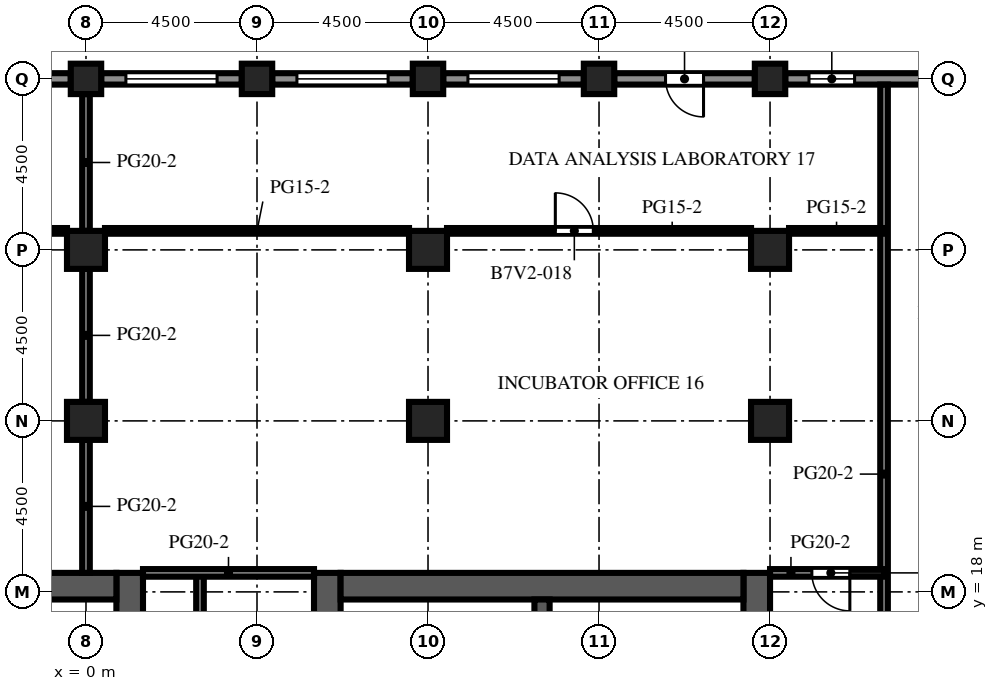
"""IFC4 building model, lengths in metres.
Left out: names, types, materials, properties, quantities, classifications, styles, units other than length and angle.
Written with IfcOpenShell. Run it as: python <this file> out.ifc"""

import sys

from ifc_helpers import new_model, si_unit, direction, frame, frame_2d, origin, origin_2d, place, context, subcontext, project, spatial, rectangle, extrude, element, fill, save


model = new_model("IFC4")
c1 = context("Model", 3, precision=1e-05, world=origin(), true_north=direction((0.0, 1.0)))
c2 = subcontext(c1, "Body", "Model", "MODEL_VIEW")
j1 = project(units=[si_unit("LENGTHUNIT", "METRE"), si_unit("PLANEANGLEUNIT", "RADIAN")], contexts=[c1])
p1 = place(None, origin())
s1 = spatial("IfcSite", under=j1, at=p1, CompositionType="ELEMENT")
p2 = place(p1, origin())
s2 = spatial("IfcBuilding", under=s1, at=p2, CompositionType="ELEMENT")
p3 = place(p2, frame((0.0, 0.0, 256.2)))
s3 = spatial("IfcBuildingStorey", under=s2, at=p3, CompositionType="ELEMENT", Elevation=256.2)
for number, where, z_axis, x_axis in (
    (1, (0.0, 31.5, 0.0), (0.0, 0.0, 1.0), (1.0, 0.0, 0.0)),
    (2, (4.5, 31.5, 0.0), (0.0, 0.0, 1.0), (1.0, 0.0, 0.0)),
    (3, (9.0, 31.5, 0.0), (0.0, 0.0, 1.0), (1.0, 0.0, 0.0)),
    (4, (13.5, 31.5, 0.0), (0.0, 0.0, 1.0), (1.0, 0.0, 0.0)),
    (5, (18.0, 31.5, 0.0), (0.0, 0.0, 1.0), (1.0, 0.0, 0.0)),
):
    element("IfcColumn", number, at=place(p3, frame(where, z_axis=z_axis, x_axis=x_axis)), inside=s3, PredefinedType="COLUMN", context=c2, shape_type="SweptSolid", body=[
        extrude(rectangle(XDim=0.8, YDim=0.8, at=origin_2d()), origin(), (0.0, 0.0, 1.0), 4.1),
    ])
for number, where, z_axis, x_axis in (
    (6, (0.0, 22.5, 0.0), (0.0, 0.0, 1.0), (1.0, 0.0, 0.0)),
    (7, (0.0, 27.0, 0.0), (0.0, 0.0, 1.0), (1.0, 0.0, 0.0)),
    (8, (9.0, 22.5, 0.0), (0.0, 0.0, 1.0), (1.0, 0.0, 0.0)),
    (9, (9.0, 27.0, 0.0), (0.0, 0.0, 1.0), (1.0, 0.0, 0.0)),
    (10, (18.0, 22.5, 0.0), (0.0, 0.0, 1.0), (1.0, 0.0, 0.0)),
    (11, (18.0, 27.0, 0.0), (0.0, 0.0, 1.0), (1.0, 0.0, 0.0)),
):
    element("IfcColumn", number, at=place(p3, frame(where, z_axis=z_axis, x_axis=x_axis)), inside=s3, PredefinedType="COLUMN", context=c2, shape_type="SweptSolid", body=[
        extrude(rectangle(XDim=1.0, YDim=1.0, at=origin_2d()), origin(), (0.0, 0.0, 1.0), 4.1),
    ])
p4 = place(p3, frame((1.15, -9.0, 0.0), z_axis=(0.0, 0.0, 1.0), x_axis=(0.0, 1.0, 0.0)))
e12 = element("IfcWall", 12, at=p4, inside=s3, PredefinedType="SHEAR", context=c2, shape_type="SweptSolid", body=[
    extrude(rectangle(XDim=27.5, YDim=0.7, at=frame_2d((13.75, 0.0))), origin(), (0.0, 0.0, 1.0), 4.1),
])
p5 = place(p4, frame((12.55, 0.0, 0.0)))
e13 = element("IfcOpeningElement", 13, at=p5, cuts=e12, PredefinedType="OPENING", context=c2, shape_type="SweptSolid", body=[
    extrude(rectangle(XDim=2.4, YDim=2.4, at=frame_2d((1.2, 1.2))), frame((0.0, 0.36, 0.0), z_axis=(0.0, -1.0, 0.0), x_axis=(1.0, 0.0, 0.0)), (0.0, 0.0, 1.0), 0.72),
])
p6 = place(p4, frame((3.788, 0.0, 0.0)))
e14 = element("IfcOpeningElement", 14, at=p6, cuts=e12, PredefinedType="OPENING", context=c2, shape_type="SweptSolid", body=[
    extrude(rectangle(XDim=0.968, YDim=2.1, at=frame_2d((0.484, 1.05))), frame((0.0, 0.36, 0.0), z_axis=(0.0, -1.0, 0.0), x_axis=(1.0, 0.0, 0.0)), (0.0, 0.0, 1.0), 0.72),
])
p7 = place(p4, frame((23.54, 0.0, 0.0)))
e15 = element("IfcOpeningElement", 15, at=p7, cuts=e12, PredefinedType="OPENING", context=c2, shape_type="SweptSolid", body=[
    extrude(rectangle(XDim=1.2, YDim=2.1, at=frame_2d((0.6, 1.05))), frame((0.0, 0.36, 0.0), z_axis=(0.0, -1.0, 0.0), x_axis=(1.0, 0.0, 0.0)), (0.0, 0.0, 1.0), 0.72),
])
p8 = place(p3, frame((-9.8, 18.15, 0.0), z_axis=(0.0, 0.0, 1.0), x_axis=(1.0, 0.0, 0.0)))
e16 = element("IfcWall", 16, at=p8, inside=s3, PredefinedType="SHEAR", context=c2, shape_type="SweptSolid", body=[
    extrude(rectangle(XDim=10.6, YDim=0.7, at=frame_2d((5.3, 0.0))), origin(), (0.0, 0.0, 1.0), 4.1),
])
p9 = place(p3, frame((6.35, -9.0, 0.0), z_axis=(0.0, 0.0, 1.0), x_axis=(0.0, 1.0, 0.0)))
e17 = element("IfcWall", 17, at=p9, inside=s3, PredefinedType="SHEAR", context=c2, shape_type="SweptSolid", body=[
    extrude(rectangle(XDim=27.5, YDim=0.7, at=frame_2d((13.75, 0.0))), origin(), (0.0, 0.0, 1.0), 4.1),
])
p10 = place(p9, frame((12.55, 0.0, 0.0)))
e18 = element("IfcOpeningElement", 18, at=p10, cuts=e17, PredefinedType="OPENING", context=c2, shape_type="SweptSolid", body=[
    extrude(rectangle(XDim=2.4, YDim=2.4, at=frame_2d((1.2, 1.2))), frame((0.0, 0.36, 0.0), z_axis=(0.0, -1.0, 0.0), x_axis=(1.0, 0.0, 0.0)), (0.0, 0.0, 1.0), 0.72),
])
p11 = place(p9, frame((3.788, 0.0, 0.0)))
e19 = element("IfcOpeningElement", 19, at=p11, cuts=e17, PredefinedType="OPENING", context=c2, shape_type="SweptSolid", body=[
    extrude(rectangle(XDim=0.968, YDim=2.1, at=frame_2d((0.484, 1.05))), frame((0.0, 0.36, 0.0), z_axis=(0.0, -1.0, 0.0), x_axis=(1.0, 0.0, 0.0)), (0.0, 0.0, 1.0), 0.72),
])
p12 = place(p9, frame((23.54, 0.0, 0.0)))
e20 = element("IfcOpeningElement", 20, at=p12, cuts=e17, PredefinedType="OPENING", context=c2, shape_type="SweptSolid", body=[
    extrude(rectangle(XDim=1.2, YDim=2.1, at=frame_2d((0.6, 1.05))), frame((0.0, 0.36, 0.0), z_axis=(0.0, -1.0, 0.0), x_axis=(1.0, 0.0, 0.0)), (0.0, 0.0, 1.0), 0.72),
])
p13 = place(p3, frame((17.65, -9.0, 0.0), z_axis=(0.0, 0.0, 1.0), x_axis=(0.0, 1.0, 0.0)))
e21 = element("IfcWall", 21, at=p13, inside=s3, PredefinedType="SHEAR", context=c2, shape_type="SweptSolid", body=[
    extrude(rectangle(XDim=27.5, YDim=0.7, at=frame_2d((13.75, 0.0))), origin(), (0.0, 0.0, 1.0), 4.1),
])
p14 = place(p13, frame((12.55, 0.0, 0.0)))
e22 = element("IfcOpeningElement", 22, at=p14, cuts=e21, PredefinedType="OPENING", context=c2, shape_type="SweptSolid", body=[
    extrude(rectangle(XDim=2.4, YDim=2.4, at=frame_2d((1.2, 1.2))), frame((0.0, 0.36, 0.0), z_axis=(0.0, -1.0, 0.0), x_axis=(1.0, 0.0, 0.0)), (0.0, 0.0, 1.0), 0.72),
])
p15 = place(p13, frame((6.825, 0.0, 0.0)))
e23 = element("IfcOpeningElement", 23, at=p15, cuts=e21, PredefinedType="OPENING", context=c2, shape_type="SweptSolid", body=[
    extrude(rectangle(XDim=1.2, YDim=2.1, at=frame_2d((0.6, 1.05))), frame((0.0, 0.36, 0.0), z_axis=(0.0, -1.0, 0.0), x_axis=(1.0, 0.0, 0.0)), (0.0, 0.0, 1.0), 0.72),
])
p16 = place(p13, frame((19.475, 0.0, 0.0)))
e24 = element("IfcOpeningElement", 24, at=p16, cuts=e21, PredefinedType="OPENING", context=c2, shape_type="SweptSolid", body=[
    extrude(rectangle(XDim=1.2, YDim=2.1, at=frame_2d((0.6, 1.05))), frame((0.0, 0.36, 0.0), z_axis=(0.0, -1.0, 0.0), x_axis=(1.0, 0.0, 0.0)), (0.0, 0.0, 1.0), 0.72),
])
p17 = place(p3, frame((6.7, 18.15, 0.0), z_axis=(0.0, 0.0, 1.0), x_axis=(1.0, 0.0, 0.0)))
e25 = element("IfcWall", 25, at=p17, inside=s3, PredefinedType="SHEAR", context=c2, shape_type="SweptSolid", body=[
    extrude(rectangle(XDim=10.6, YDim=0.7, at=frame_2d((5.3, 0.0))), origin(), (0.0, 0.0, 1.0), 4.1),
])
p18 = place(p3, frame((12.0, 10.2, 0.0), z_axis=(0.0, 0.0, 1.0), x_axis=(0.0, 1.0, 0.0)))
e26 = element("IfcWall", 26, at=p18, inside=s3, PredefinedType="SHEAR", context=c2, shape_type="SweptSolid", body=[
    extrude(rectangle(XDim=7.6, YDim=0.4, at=frame_2d((3.8, 0.0))), origin(), (0.0, 0.0, 1.0), 4.1),
])
p19 = place(p3, frame((18.4, 31.5, 0.0), z_axis=(0.0, 0.0, 1.0), x_axis=(1.0, 0.0, 0.0)))
e27 = element("IfcWall", 27, at=p19, inside=s3, PredefinedType="SOLIDWALL", context=c2, shape_type="SweptSolid", body=[
    extrude(rectangle(XDim=3.7, YDim=0.3, at=frame_2d((1.85, 0.0))), origin(), (0.0, 0.0, 1.0), 2.7),
])
p20 = place(p19, frame((0.625, 0.0, 0.8)))
e28 = element("IfcOpeningElement", 28, at=p20, cuts=e27, PredefinedType="OPENING", context=c2, shape_type="SweptSolid", body=[
    extrude(rectangle(XDim=1.2, YDim=1.7, at=frame_2d((0.6, 0.85))), frame((0.0, 0.16, 0.0), z_axis=(0.0, -1.0, 0.0), x_axis=(1.0, 0.0, 0.0)), (0.0, 0.0, 1.0), 0.32),
])
p21 = place(p3, frame((13.9, 31.5, 0.0), z_axis=(0.0, 0.0, 1.0), x_axis=(1.0, 0.0, 0.0)))
e29 = element("IfcWall", 29, at=p21, inside=s3, PredefinedType="SOLIDWALL", context=c2, shape_type="SweptSolid", body=[
    extrude(rectangle(XDim=3.7, YDim=0.3, at=frame_2d((1.85, 0.0))), origin(), (0.0, 0.0, 1.0), 2.7),
])
p22 = place(p21, frame((1.35, 0.0, 0.0)))
e30 = element("IfcOpeningElement", 30, at=p22, cuts=e29, PredefinedType="OPENING", context=c2, shape_type="SweptSolid", body=[
    extrude(rectangle(XDim=1.0, YDim=2.2, at=frame_2d((0.5, 1.1))), frame((0.0, 0.16, 0.0), z_axis=(0.0, -1.0, 0.0), x_axis=(1.0, 0.0, 0.0)), (0.0, 0.0, 1.0), 0.32),
])
p23 = place(p3, frame((9.4, 31.5, 0.0), z_axis=(0.0, 0.0, 1.0), x_axis=(1.0, 0.0, 0.0)))
e31 = element("IfcWall", 31, at=p23, inside=s3, PredefinedType="SOLIDWALL", context=c2, shape_type="SweptSolid", body=[
    extrude(rectangle(XDim=3.7, YDim=0.3, at=frame_2d((1.85, 0.0))), origin(), (0.0, 0.0, 1.0), 2.7),
])
p24 = place(p23, frame((0.65, 0.0, 0.8)))
e32 = element("IfcOpeningElement", 32, at=p24, cuts=e31, PredefinedType="OPENING", context=c2, shape_type="SweptSolid", body=[
    extrude(rectangle(XDim=2.4, YDim=1.7, at=frame_2d((1.2, 0.85))), frame((0.0, 0.16, 0.0), z_axis=(0.0, -1.0, 0.0), x_axis=(1.0, 0.0, 0.0)), (0.0, 0.0, 1.0), 0.32),
])
p25 = place(p3, frame((4.9, 31.5, 0.0), z_axis=(0.0, 0.0, 1.0), x_axis=(1.0, 0.0, 0.0)))
e33 = element("IfcWall", 33, at=p25, inside=s3, PredefinedType="SOLIDWALL", context=c2, shape_type="SweptSolid", body=[
    extrude(rectangle(XDim=3.7, YDim=0.3, at=frame_2d((1.85, 0.0))), origin(), (0.0, 0.0, 1.0), 2.7),
])
p26 = place(p25, frame((0.65, 0.0, 0.8)))
e34 = element("IfcOpeningElement", 34, at=p26, cuts=e33, PredefinedType="OPENING", context=c2, shape_type="SweptSolid", body=[
    extrude(rectangle(XDim=2.4, YDim=1.7, at=frame_2d((1.2, 0.85))), frame((0.0, 0.16, 0.0), z_axis=(0.0, -1.0, 0.0), x_axis=(1.0, 0.0, 0.0)), (0.0, 0.0, 1.0), 0.32),
])
p27 = place(p3, frame((0.4, 31.5, 0.0), z_axis=(0.0, 0.0, 1.0), x_axis=(1.0, 0.0, 0.0)))
e35 = element("IfcWall", 35, at=p27, inside=s3, PredefinedType="SOLIDWALL", context=c2, shape_type="SweptSolid", body=[
    extrude(rectangle(XDim=3.7, YDim=0.3, at=frame_2d((1.85, 0.0))), origin(), (0.0, 0.0, 1.0), 2.7),
])
p28 = place(p27, frame((0.65, 0.0, 0.8)))
e36 = element("IfcOpeningElement", 36, at=p28, cuts=e35, PredefinedType="OPENING", context=c2, shape_type="SweptSolid", body=[
    extrude(rectangle(XDim=2.4, YDim=1.7, at=frame_2d((1.2, 0.85))), frame((0.0, 0.16, 0.0), z_axis=(0.0, -1.0, 0.0), x_axis=(1.0, 0.0, 0.0)), (0.0, 0.0, 1.0), 0.32),
])
p29 = place(p3, frame((-4.1, 31.5, 0.0), z_axis=(0.0, 0.0, 1.0), x_axis=(1.0, 0.0, 0.0)))
e37 = element("IfcWall", 37, at=p29, inside=s3, PredefinedType="SOLIDWALL", context=c2, shape_type="SweptSolid", body=[
    extrude(rectangle(XDim=3.7, YDim=0.3, at=frame_2d((1.85, 0.0))), origin(), (0.0, 0.0, 1.0), 2.7),
])
p30 = place(p29, frame((0.65, 0.0, 0.8)))
e38 = element("IfcOpeningElement", 38, at=p30, cuts=e37, PredefinedType="OPENING", context=c2, shape_type="SweptSolid", body=[
    extrude(rectangle(XDim=2.4, YDim=1.7, at=frame_2d((1.2, 0.85))), frame((0.0, 0.16, 0.0), z_axis=(0.0, -1.0, 0.0), x_axis=(1.0, 0.0, 0.0)), (0.0, 0.0, 1.0), 0.32),
])
p31 = place(p3, frame((-0.5, 15.14, 0.0), z_axis=(0.0, 0.0, 1.0), x_axis=(0.0, 1.0, 0.0)))
e39 = element("IfcWall", 39, at=p31, inside=s3, PredefinedType="PARTITIONING", context=c2, shape_type="SweptSolid", body=[
    extrude(rectangle(XDim=2.66, YDim=0.1, at=frame_2d((1.33, 0.0))), origin(), (0.0, 0.0, 1.0), 3.5),
])
p32 = place(p31, frame((0.83, 0.0, 0.0)))
e40 = element("IfcOpeningElement", 40, at=p32, cuts=e39, PredefinedType="OPENING", context=c2, shape_type="SweptSolid", body=[
    extrude(rectangle(XDim=1.0, YDim=2.1, at=frame_2d((0.5, 1.05))), frame((0.0, 0.06, 0.0), z_axis=(0.0, -1.0, 0.0), x_axis=(1.0, 0.0, 0.0)), (0.0, 0.0, 1.0), 0.12),
])
p33 = place(p3, frame((8.0, 15.14, 0.0), z_axis=(0.0, 0.0, 1.0), x_axis=(0.0, 1.0, 0.0)))
e41 = element("IfcWall", 41, at=p33, inside=s3, PredefinedType="PARTITIONING", context=c2, shape_type="SweptSolid", body=[
    extrude(rectangle(XDim=2.66, YDim=0.1, at=frame_2d((1.33, 0.0))), origin(), (0.0, 0.0, 1.0), 3.5),
])
p34 = place(p33, frame((0.83, 0.0, 0.0)))
e42 = element("IfcOpeningElement", 42, at=p34, cuts=e41, PredefinedType="OPENING", context=c2, shape_type="SweptSolid", body=[
    extrude(rectangle(XDim=1.0, YDim=2.1, at=frame_2d((0.5, 1.05))), frame((0.0, 0.06, 0.0), z_axis=(0.0, -1.0, 0.0), x_axis=(1.0, 0.0, 0.0)), (0.0, 0.0, 1.0), 0.12),
])
for number, where, z_axis, x_axis in (
    (43, (0.0, 18.5, 0.0), (0.0, 0.0, 1.0), (0.0, 1.0, 0.0)),
    (44, (0.0, 23.0, 0.0), (0.0, 0.0, 1.0), (0.0, 1.0, 0.0)),
):
    element("IfcWall", number, at=place(p3, frame(where, z_axis=z_axis, x_axis=x_axis)), inside=s3, PredefinedType="PARTITIONING", context=c2, shape_type="SweptSolid", body=[
        extrude(rectangle(XDim=3.5, YDim=0.2, at=frame_2d((1.75, 0.0))), origin(), (0.0, 0.0, 1.0), 3.5),
    ])
p35 = place(p3, frame((0.0, 27.5, 0.0), z_axis=(0.0, 0.0, 1.0), x_axis=(0.0, 1.0, 0.0)))
e45 = element("IfcWall", 45, at=p35, inside=s3, PredefinedType="PARTITIONING", context=c2, shape_type="SweptSolid", body=[
    extrude(rectangle(XDim=3.6, YDim=0.2, at=frame_2d((1.8, 0.0))), origin(), (0.0, 0.0, 1.0), 3.5),
])
p36 = place(p3, frame((3.0, 6.7, 0.0), z_axis=(0.0, 0.0, 1.0), x_axis=(0.0, 1.0, 0.0)))
e46 = element("IfcWall", 46, at=p36, inside=s3, PredefinedType="PARTITIONING", context=c2, shape_type="SweptSolid", body=[
    extrude(rectangle(XDim=11.8, YDim=0.2, at=frame_2d((5.9, 0.0))), origin(), (0.0, 0.0, 1.0), 3.5),
])
p37 = place(p36, frame((7.1, 0.0, 0.0)))
e47 = element("IfcOpeningElement", 47, at=p37, cuts=e46, PredefinedType="OPENING", context=c2, shape_type="SweptSolid", body=[
    extrude(rectangle(XDim=1.0, YDim=2.1, at=frame_2d((0.5, 1.05))), frame((0.0, 0.11, 0.0), z_axis=(0.0, -1.0, 0.0), x_axis=(1.0, 0.0, 0.0)), (0.0, 0.0, 1.0), 0.22),
])
p38 = place(p3, frame((21.0, 31.35, 0.0), z_axis=(0.0, 0.0, 1.0), x_axis=(0.0, -1.0, 0.0)))
e48 = element("IfcWall", 48, at=p38, inside=s3, PredefinedType="PARTITIONING", context=c2, shape_type="SweptSolid", body=[
    extrude(rectangle(XDim=25.1, YDim=0.2, at=frame_2d((12.55, 0.0))), origin(), (0.0, 0.0, 1.0), 3.5),
])
p39 = place(p38, frame((20.5, 0.0, 0.0)))
e49 = element("IfcOpeningElement", 49, at=p39, cuts=e48, PredefinedType="OPENING", context=c2, shape_type="SweptSolid", body=[
    extrude(rectangle(XDim=1.0, YDim=2.1, at=frame_2d((0.5, 1.05))), frame((0.0, 0.11, 0.0), z_axis=(0.0, -1.0, 0.0), x_axis=(1.0, 0.0, 0.0)), (0.0, 0.0, 1.0), 0.22),
])
p40 = place(p3, frame((1.5, 18.5, 0.0), z_axis=(0.0, 0.0, 1.0), x_axis=(1.0, 0.0, 0.0)))
e50 = element("IfcWall", 50, at=p40, inside=s3, PredefinedType="PARTITIONING", context=c2, shape_type="SweptSolid", body=[
    extrude(rectangle(XDim=4.5, YDim=0.2, at=frame_2d((2.25, 0.0))), origin(), (0.0, 0.0, 1.0), 3.5),
])
p41 = place(p3, frame((18.0, 18.5, 0.0), z_axis=(0.0, 0.0, 1.0), x_axis=(1.0, 0.0, 0.0)))
e51 = element("IfcWall", 51, at=p41, inside=s3, PredefinedType="PARTITIONING", context=c2, shape_type="SweptSolid", body=[
    extrude(rectangle(XDim=3.0, YDim=0.2, at=frame_2d((1.5, 0.0))), origin(), (0.0, 0.0, 1.0), 3.5),
])
p42 = place(p41, frame((1.1, 0.0, 0.0)))
e52 = element("IfcOpeningElement", 52, at=p42, cuts=e51, PredefinedType="OPENING", context=c2, shape_type="SweptSolid", body=[
    extrude(rectangle(XDim=1.0, YDim=2.1, at=frame_2d((0.5, 1.05))), frame((0.0, 0.11, 0.0), z_axis=(0.0, -1.0, 0.0), x_axis=(1.0, 0.0, 0.0)), (0.0, 0.0, 1.0), 0.22),
])
p43 = place(p3, frame((-8.5, 27.5, 0.0), z_axis=(0.0, 0.0, 1.0), x_axis=(1.0, 0.0, 0.0)))
e53 = element("IfcWall", 53, at=p43, inside=s3, PredefinedType="PARTITIONING", context=c2, shape_type="SweptSolid", body=[
    extrude(rectangle(XDim=8.0, YDim=0.15, at=frame_2d((4.0, 0.0))), origin(), (0.0, 0.0, 1.0), 3.5),
])
p44 = place(p43, frame((1.6, 0.0, 0.0)))
e54 = element("IfcOpeningElement", 54, at=p44, cuts=e53, PredefinedType="OPENING", context=c2, shape_type="SweptSolid", body=[
    extrude(rectangle(XDim=1.0, YDim=2.1, at=frame_2d((0.5, 1.05))), frame((0.0, 0.085, 0.0), z_axis=(0.0, -1.0, 0.0), x_axis=(1.0, 0.0, 0.0)), (0.0, 0.0, 1.0), 0.17),
])
p45 = place(p3, frame((0.5, 27.5, 0.0), z_axis=(0.0, 0.0, 1.0), x_axis=(1.0, 0.0, 0.0)))
e55 = element("IfcWall", 55, at=p45, inside=s3, PredefinedType="PARTITIONING", context=c2, shape_type="SweptSolid", body=[
    extrude(rectangle(XDim=8.0, YDim=0.15, at=frame_2d((4.0, 0.0))), origin(), (0.0, 0.0, 1.0), 3.5),
])
p46 = place(p3, frame((9.5, 27.5, 0.0), z_axis=(0.0, 0.0, 1.0), x_axis=(1.0, 0.0, 0.0)))
e56 = element("IfcWall", 56, at=p46, inside=s3, PredefinedType="PARTITIONING", context=c2, shape_type="SweptSolid", body=[
    extrude(rectangle(XDim=8.0, YDim=0.15, at=frame_2d((4.0, 0.0))), origin(), (0.0, 0.0, 1.0), 3.5),
])
p47 = place(p46, frame((2.85, 0.0, 0.0)))
e57 = element("IfcOpeningElement", 57, at=p47, cuts=e56, PredefinedType="OPENING", context=c2, shape_type="SweptSolid", body=[
    extrude(rectangle(XDim=1.0, YDim=2.1, at=frame_2d((0.5, 1.05))), frame((0.0, 0.085, 0.0), z_axis=(0.0, -1.0, 0.0), x_axis=(1.0, 0.0, 0.0)), (0.0, 0.0, 1.0), 0.17),
])
p48 = place(p3, frame((18.5, 27.5, 0.0), z_axis=(0.0, 0.0, 1.0), x_axis=(1.0, 0.0, 0.0)))
e58 = element("IfcWall", 58, at=p48, inside=s3, PredefinedType="PARTITIONING", context=c2, shape_type="SweptSolid", body=[
    extrude(rectangle(XDim=2.5, YDim=0.15, at=frame_2d((1.25, 0.0))), origin(), (0.0, 0.0, 1.0), 3.5),
])
p49 = place(p20, origin())
e59 = element("IfcWindow", 59, at=p49, inside=s3, PartitioningType="SINGLE_PANEL", PredefinedType="WINDOW", context=c2, shape_type="SweptSolid", body=[
    extrude(rectangle(XDim=1.2, YDim=1.7, at=frame_2d((0.6, 0.85))), frame((0.0, 0.03, 0.0), z_axis=(0.0, -1.0, 0.0), x_axis=(1.0, 0.0, 0.0)), (0.0, 0.0, 1.0), 0.06),
])
fill(e28, e59)
p50 = place(p22, origin())
e60 = element("IfcDoor", 60, at=p50, inside=s3, OperationType="SINGLE_SWING_RIGHT", PredefinedType="DOOR", context=c2, shape_type="SweptSolid", body=[
    extrude(rectangle(XDim=1.0, YDim=2.2, at=frame_2d((0.5, 1.1))), frame((0.0, 0.025, 0.0), z_axis=(0.0, -1.0, 0.0), x_axis=(1.0, 0.0, 0.0)), (0.0, 0.0, 1.0), 0.05),
])
fill(e30, e60)
p51 = place(p24, origin())
e61 = element("IfcWindow", 61, at=p51, inside=s3, PartitioningType="SINGLE_PANEL", PredefinedType="WINDOW", context=c2, shape_type="SweptSolid", body=[
    extrude(rectangle(XDim=2.4, YDim=1.7, at=frame_2d((1.2, 0.85))), frame((0.0, 0.03, 0.0), z_axis=(0.0, -1.0, 0.0), x_axis=(1.0, 0.0, 0.0)), (0.0, 0.0, 1.0), 0.06),
])
fill(e32, e61)
p52 = place(p26, origin())
e62 = element("IfcWindow", 62, at=p52, inside=s3, PartitioningType="SINGLE_PANEL", PredefinedType="WINDOW", context=c2, shape_type="SweptSolid", body=[
    extrude(rectangle(XDim=2.4, YDim=1.7, at=frame_2d((1.2, 0.85))), frame((0.0, 0.03, 0.0), z_axis=(0.0, -1.0, 0.0), x_axis=(1.0, 0.0, 0.0)), (0.0, 0.0, 1.0), 0.06),
])
fill(e34, e62)
p53 = place(p28, origin())
e63 = element("IfcWindow", 63, at=p53, inside=s3, PartitioningType="SINGLE_PANEL", PredefinedType="WINDOW", context=c2, shape_type="SweptSolid", body=[
    extrude(rectangle(XDim=2.4, YDim=1.7, at=frame_2d((1.2, 0.85))), frame((0.0, 0.03, 0.0), z_axis=(0.0, -1.0, 0.0), x_axis=(1.0, 0.0, 0.0)), (0.0, 0.0, 1.0), 0.06),
])
fill(e36, e63)
p54 = place(p42, origin())
e64 = element("IfcDoor", 64, at=p54, inside=s3, OperationType="SINGLE_SWING_RIGHT", PredefinedType="DOOR", context=c2, shape_type="SweptSolid", body=[
    extrude(rectangle(XDim=1.0, YDim=2.1, at=frame_2d((0.5, 1.05))), frame((0.0, 0.025, 0.0), z_axis=(0.0, -1.0, 0.0), x_axis=(1.0, 0.0, 0.0)), (0.0, 0.0, 1.0), 0.05),
])
fill(e52, e64)
p55 = place(p47, origin())
e65 = element("IfcDoor", 65, at=p55, inside=s3, OperationType="SINGLE_SWING_LEFT", PredefinedType="DOOR", context=c2, shape_type="SweptSolid", body=[
    extrude(rectangle(XDim=1.0, YDim=2.1, at=frame_2d((0.5, 1.05))), frame((0.0, 0.025, 0.0), z_axis=(0.0, -1.0, 0.0), x_axis=(1.0, 0.0, 0.0)), (0.0, 0.0, 1.0), 0.05),
])
fill(e57, e65)
save(model, sys.argv[1])
